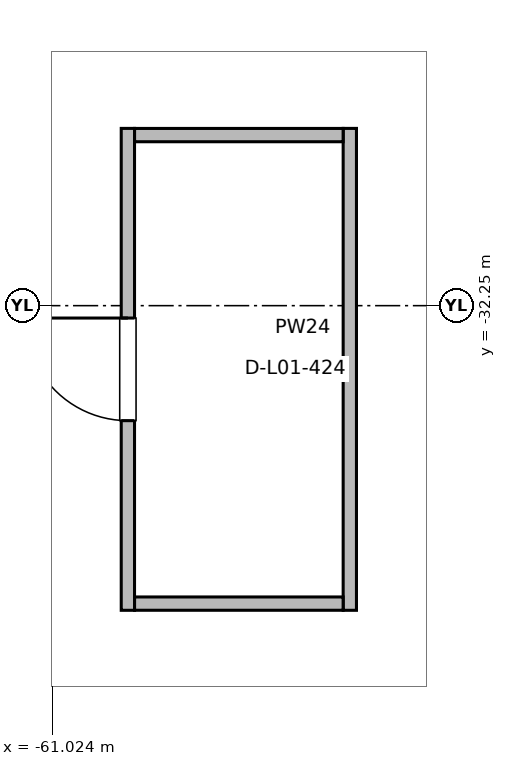
"""IFC4 building model, lengths in metres.
Left out: names, types, materials, properties, quantities, classifications, styles, units other than length and angle.
Written with IfcOpenShell. Run it as: python <this file> out.ifc"""

import sys

from ifc_helpers import new_model, si_unit, direction, frame, frame_2d, origin, place, context, subcontext, project, spatial, rectangle, extrude, element, fill, save


model = new_model("IFC4")
c1 = context("Model", 3, precision=1e-05, world=origin(), true_north=direction((0.0, 1.0)))
c2 = subcontext(c1, "Body", "Model", "MODEL_VIEW")
j1 = project(units=[si_unit("LENGTHUNIT", "METRE"), si_unit("PLANEANGLEUNIT", "RADIAN")], contexts=[c1])
p1 = place(None, origin())
s1 = spatial("IfcSite", under=j1, at=p1, CompositionType="ELEMENT")
p2 = place(p1, origin())
s2 = spatial("IfcBuilding", under=s1, at=p2, CompositionType="ELEMENT")
p3 = place(p2, origin())
s3 = spatial("IfcBuildingStorey", under=s2, at=p3, CompositionType="ELEMENT", Elevation=0.0)
p4 = place(p3, frame((-60.028, -36.258, 0.0), z_axis=(0.0, 0.0, 1.0), x_axis=(0.0, 1.0, 0.0)))
e1 = element("IfcWall", 1, at=p4, inside=s3, PredefinedType="PARTITIONING", context=c2, shape_type="SweptSolid", body=[
    extrude(rectangle(XDim=6.34, YDim=0.175, at=frame_2d((3.17, 0.0))), origin(), (0.0, 0.0, 1.0), 5.02),
])
p5 = place(p4, frame((2.495, 0.0, 0.0)))
e2 = element("IfcOpeningElement", 2, at=p5, cuts=e1, PredefinedType="OPENING", context=c2, shape_type="SweptSolid", body=[
    extrude(rectangle(XDim=1.35, YDim=2.2, at=frame_2d((0.675, 1.1))), frame((0.0, 0.097, 0.0), z_axis=(0.0, -1.0, 0.0), x_axis=(1.0, 0.0, 0.0)), (0.0, 0.0, 1.0), 0.195),
])
p6 = place(p3, frame((-57.108, -36.258, 0.0), z_axis=(0.0, 0.0, 1.0), x_axis=(0.0, 1.0, 0.0)))
e3 = element("IfcWall", 3, at=p6, inside=s3, PredefinedType="PARTITIONING", context=c2, shape_type="SweptSolid", body=[
    extrude(rectangle(XDim=6.34, YDim=0.175, at=frame_2d((3.17, 0.0))), origin(), (0.0, 0.0, 1.0), 5.02),
])
for number, where, z_axis, x_axis in (
    (4, (-59.94, -36.17, 0.0), (0.0, 0.0, 1.0), (1.0, 0.0, 0.0)),
    (5, (-59.94, -30.006, 0.0), (0.0, 0.0, 1.0), (1.0, 0.0, 0.0)),
):
    element("IfcWall", number, at=place(p3, frame(where, z_axis=z_axis, x_axis=x_axis)), inside=s3, PredefinedType="PARTITIONING", context=c2, shape_type="SweptSolid", body=[
        extrude(rectangle(XDim=2.744, YDim=0.175, at=frame_2d((1.372, 0.0))), origin(), (0.0, 0.0, 1.0), 5.02),
    ])
p7 = place(p5, origin())
e6 = element("IfcDoor", 6, at=p7, inside=s3, OperationType="SINGLE_SWING_RIGHT", PredefinedType="DOOR", context=c2, shape_type="SweptSolid", body=[
    extrude(rectangle(XDim=1.35, YDim=2.2, at=frame_2d((0.675, 1.1))), frame((0.0, 0.025, 0.0), z_axis=(0.0, -1.0, 0.0), x_axis=(1.0, 0.0, 0.0)), (0.0, 0.0, 1.0), 0.05),
])
fill(e2, e6)
save(model, sys.argv[1])
